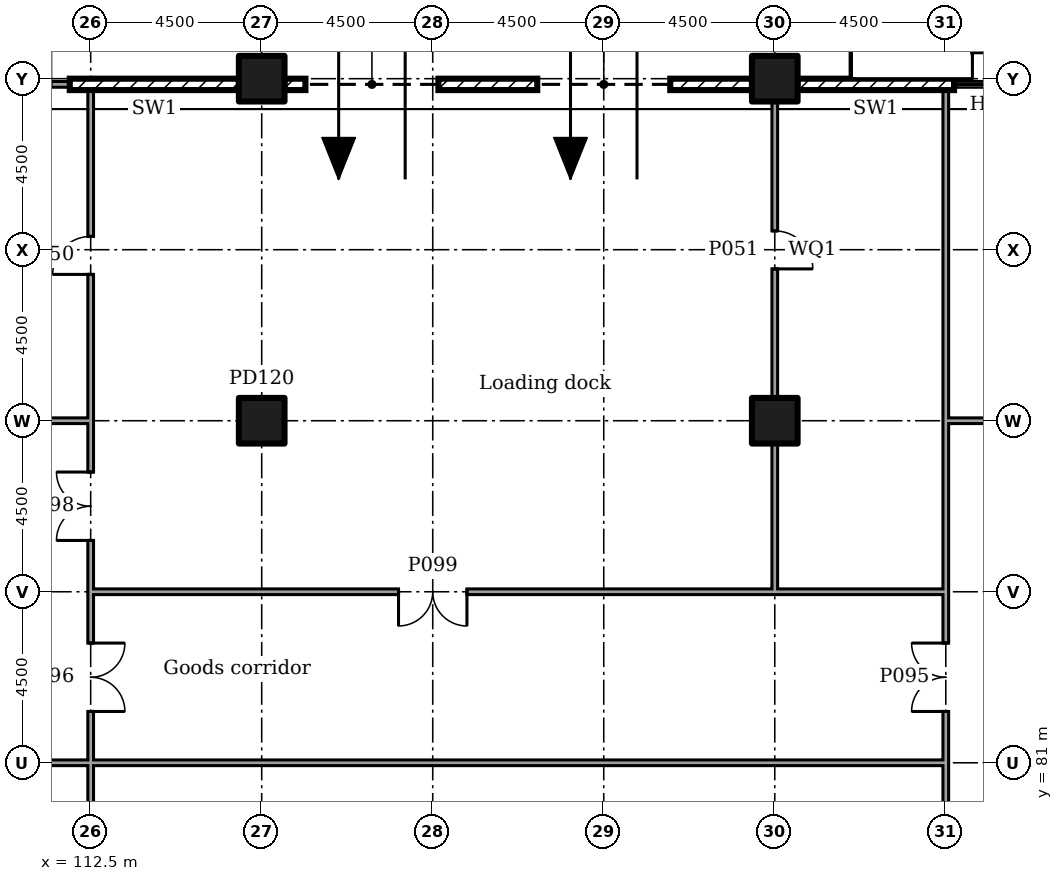
"""IFC4 building model, lengths in metres.
Left out: names, types, materials, properties, quantities, classifications, styles, units other than length and angle.
Written with IfcOpenShell. Run it as: python <this file> out.ifc"""

import sys

from ifc_helpers import new_model, si_unit, direction, frame, frame_2d, origin, origin_2d, place, context, subcontext, project, spatial, rectangle, extrude, element, fill, save


model = new_model("IFC4")
c1 = context("Model", 3, precision=1e-05, world=origin(), true_north=direction((0.0, 1.0)))
c2 = subcontext(c1, "Body", "Model", "MODEL_VIEW")
j1 = project(units=[si_unit("LENGTHUNIT", "METRE"), si_unit("PLANEANGLEUNIT", "RADIAN")], contexts=[c1])
p1 = place(None, origin())
s1 = spatial("IfcSite", under=j1, at=p1, CompositionType="ELEMENT")
p2 = place(p1, origin())
s2 = spatial("IfcBuilding", under=s1, at=p2, CompositionType="ELEMENT")
p3 = place(p2, origin())
s3 = spatial("IfcBuildingStorey", under=s2, at=p3, CompositionType="ELEMENT", Elevation=0.0)
for number, where in (
    (1, (117.0, 90.0, 0.0)),
    (2, (117.0, 99.0, 0.0)),
    (3, (130.5, 90.0, 0.0)),
    (4, (130.5, 99.0, 0.0)),
):
    element("IfcColumn", number, at=place(p3, frame(where)), inside=s3, PredefinedType="COLUMN", context=c2, shape_type="SweptSolid", body=[
        extrude(rectangle(XDim=1.2, YDim=1.2, at=origin_2d()), origin(), (0.0, 0.0, 1.0), 6.0),
    ])
p4 = place(p3, frame((135.217, 98.85, 0.0), z_axis=(0.0, 0.0, 1.0), x_axis=(-1.0, 0.0, 0.0)))
e5 = element("IfcWall", 5, at=p4, inside=s3, PredefinedType="ELEMENTEDWALL", context=c2, shape_type="SweptSolid", body=[
    extrude(rectangle(XDim=4.116, YDim=0.3, at=frame_2d((2.058, 0.0))), origin(), (0.0, 0.0, 1.0), 5.55),
])
p5 = place(p3, frame((129.9, 98.85, 0.0), z_axis=(0.0, 0.0, 1.0), x_axis=(-1.0, 0.0, 0.0)))
e6 = element("IfcWall", 6, at=p5, inside=s3, PredefinedType="ELEMENTEDWALL", context=c2, shape_type="SweptSolid", body=[
    extrude(rectangle(XDim=1.65, YDim=0.3, at=frame_2d((0.825, 0.0))), origin(), (0.0, 0.0, 1.0), 5.55),
])
p6 = place(p3, frame((128.25, 98.85, 0.0), z_axis=(0.0, 0.0, 1.0), x_axis=(-1.0, 0.0, 0.0)))
e7 = element("IfcWall", 7, at=p6, inside=s3, PredefinedType="ELEMENTEDWALL", context=c2, shape_type="SweptSolid", body=[
    extrude(rectangle(XDim=4.5, YDim=0.3, at=frame_2d((2.25, 0.0))), origin(), (0.0, 0.0, 1.0), 5.55),
])
p7 = place(p6, frame((0.5, 0.0, 0.0)))
e8 = element("IfcOpeningElement", 8, at=p7, cuts=e7, PredefinedType="OPENING", context=c2, shape_type="SweptSolid", body=[
    extrude(rectangle(XDim=3.5, YDim=4.5, at=frame_2d((1.75, 2.25))), frame((0.0, 0.16, 0.0), z_axis=(0.0, -1.0, 0.0), x_axis=(1.0, 0.0, 0.0)), (0.0, 0.0, 1.0), 0.32),
])
p8 = place(p3, frame((123.75, 98.85, 0.0), z_axis=(0.0, 0.0, 1.0), x_axis=(-1.0, 0.0, 0.0)))
e9 = element("IfcWall", 9, at=p8, inside=s3, PredefinedType="ELEMENTEDWALL", context=c2, shape_type="SweptSolid", body=[
    extrude(rectangle(XDim=1.6, YDim=0.3, at=frame_2d((0.8, 0.0))), origin(), (0.0, 0.0, 1.0), 5.55),
])
p9 = place(p3, frame((122.15, 98.85, 0.0), z_axis=(0.0, 0.0, 1.0), x_axis=(-1.0, 0.0, 0.0)))
e10 = element("IfcWall", 10, at=p9, inside=s3, PredefinedType="ELEMENTEDWALL", context=c2, shape_type="SweptSolid", body=[
    extrude(rectangle(XDim=4.55, YDim=0.3, at=frame_2d((2.275, 0.0))), origin(), (0.0, 0.0, 1.0), 5.55),
])
p10 = place(p9, frame((0.5, 0.0, 0.0)))
e11 = element("IfcOpeningElement", 11, at=p10, cuts=e10, PredefinedType="OPENING", context=c2, shape_type="SweptSolid", body=[
    extrude(rectangle(XDim=3.5, YDim=4.5, at=frame_2d((1.75, 2.25))), frame((0.0, 0.16, 0.0), z_axis=(0.0, -1.0, 0.0), x_axis=(1.0, 0.0, 0.0)), (0.0, 0.0, 1.0), 0.32),
])
p11 = place(p3, frame((116.4, 98.85, 0.0), z_axis=(0.0, 0.0, 1.0), x_axis=(-1.0, 0.0, 0.0)))
e12 = element("IfcWall", 12, at=p11, inside=s3, PredefinedType="ELEMENTEDWALL", context=c2, shape_type="SweptSolid", body=[
    extrude(rectangle(XDim=4.45, YDim=0.3, at=frame_2d((2.225, 0.0))), origin(), (0.0, 0.0, 1.0), 5.55),
])
p12 = place(p3, frame((111.95, 98.85, 0.0), z_axis=(0.0, 0.0, 1.0), x_axis=(-1.0, 0.0, 0.0)))
e13 = element("IfcWall", 13, at=p12, inside=s3, PredefinedType="SOLIDWALL", context=c2, shape_type="SweptSolid", body=[
    extrude(rectangle(XDim=3.4, YDim=0.15, at=frame_2d((1.7, 0.0))), origin(), (0.0, 0.0, 1.0), 5.55),
])
p13 = place(p12, frame((0.5, 0.0, 0.0)))
e14 = element("IfcOpeningElement", 14, at=p13, cuts=e13, PredefinedType="OPENING", context=c2, shape_type="SweptSolid", body=[
    extrude(rectangle(XDim=2.4, YDim=2.7, at=frame_2d((1.2, 1.35))), frame((0.0, 0.085, 0.0), z_axis=(0.0, -1.0, 0.0), x_axis=(1.0, 0.0, 0.0)), (0.0, 0.0, 1.0), 0.17),
])
p14 = place(p3, frame((135.0, 58.5, 0.0), z_axis=(0.0, 0.0, 1.0), x_axis=(0.0, 1.0, 0.0)))
e15 = element("IfcWall", 15, at=p14, inside=s3, PredefinedType="PARTITIONING", context=c2, shape_type="SweptSolid", body=[
    extrude(rectangle(XDim=22.575, YDim=0.15, at=frame_2d((11.288, 0.0))), origin(), (0.0, 0.0, 1.0), 5.55),
])
p15 = place(p14, frame((10.75, 0.0, 0.0)))
e16 = element("IfcOpeningElement", 16, at=p15, cuts=e15, PredefinedType="OPENING", context=c2, shape_type="SweptSolid", body=[
    extrude(rectangle(XDim=1.0, YDim=2.1, at=frame_2d((0.5, 1.05))), frame((0.0, 0.085, 0.0), z_axis=(0.0, -1.0, 0.0), x_axis=(1.0, 0.0, 0.0)), (0.0, 0.0, 1.0), 0.17),
])
p16 = place(p3, frame((135.0, 81.0, 0.0), z_axis=(0.0, 0.0, 1.0), x_axis=(0.0, 1.0, 0.0)))
e17 = element("IfcWall", 17, at=p16, inside=s3, PredefinedType="PARTITIONING", context=c2, shape_type="SweptSolid", body=[
    extrude(rectangle(XDim=4.575, YDim=0.15, at=frame_2d((2.288, 0.0))), origin(), (0.0, 0.0, 1.0), 5.55),
])
p17 = place(p16, frame((1.35, 0.0, 0.0)))
e18 = element("IfcOpeningElement", 18, at=p17, cuts=e17, PredefinedType="OPENING", context=c2, shape_type="SweptSolid", body=[
    extrude(rectangle(XDim=1.8, YDim=2.1, at=frame_2d((0.9, 1.05))), frame((0.0, 0.085, 0.0), z_axis=(0.0, -1.0, 0.0), x_axis=(1.0, 0.0, 0.0)), (0.0, 0.0, 1.0), 0.17),
])
p18 = place(p3, frame((135.0, 85.5, 0.0), z_axis=(0.0, 0.0, 1.0), x_axis=(0.0, 1.0, 0.0)))
e19 = element("IfcWall", 19, at=p18, inside=s3, PredefinedType="PARTITIONING", context=c2, shape_type="SweptSolid", body=[
    extrude(rectangle(XDim=4.575, YDim=0.15, at=frame_2d((2.288, 0.0))), origin(), (0.0, 0.0, 1.0), 5.55),
])
p19 = place(p3, frame((135.075, 90.0, 0.0)))
e20 = element("IfcWall", 20, at=p19, inside=s3, PredefinedType="PARTITIONING", context=c2, shape_type="SweptSolid", body=[
    extrude(rectangle(XDim=8.33, YDim=0.15, at=frame_2d((4.165, 0.0))), origin(), (0.0, 0.0, 1.0), 5.55),
])
p20 = place(p19, frame((3.625, 0.0, 0.0)))
e21 = element("IfcOpeningElement", 21, at=p20, cuts=e20, PredefinedType="OPENING", context=c2, shape_type="SweptSolid", body=[
    extrude(rectangle(XDim=1.0, YDim=2.1, at=frame_2d((0.5, 1.05))), frame((0.0, 0.085, 0.0), z_axis=(0.0, -1.0, 0.0), x_axis=(1.0, 0.0, 0.0)), (0.0, 0.0, 1.0), 0.17),
])
p21 = place(p3, frame((112.5, 59.495, 0.0), z_axis=(0.0, 0.0, 1.0), x_axis=(0.0, 1.0, 0.0)))
e22 = element("IfcWall", 22, at=p21, inside=s3, PredefinedType="PARTITIONING", context=c2, shape_type="SweptSolid", body=[
    extrude(rectangle(XDim=21.58, YDim=0.15, at=frame_2d((10.79, 0.0))), origin(), (0.0, 0.0, 1.0), 5.55),
])
p22 = place(p3, frame((94.575, 81.0, 0.0)))
e23 = element("IfcWall", 23, at=p22, inside=s3, PredefinedType="PARTITIONING", context=c2, shape_type="SweptSolid", body=[
    extrude(rectangle(XDim=17.85, YDim=0.15, at=frame_2d((8.925, 0.0))), origin(), (0.0, 0.0, 1.0), 5.55),
])
p23 = place(p3, frame((112.425, 81.0, 0.0)))
e24 = element("IfcWall", 24, at=p23, inside=s3, PredefinedType="PARTITIONING", context=c2, shape_type="SweptSolid", body=[
    extrude(rectangle(XDim=22.5, YDim=0.15, at=frame_2d((11.25, 0.0))), origin(), (0.0, 0.0, 1.0), 5.55),
])
p24 = place(p3, frame((112.5, 81.075, 0.0), z_axis=(0.0, 0.0, 1.0), x_axis=(0.0, 1.0, 0.0)))
e25 = element("IfcWall", 25, at=p24, inside=s3, PredefinedType="PARTITIONING", context=c2, shape_type="SweptSolid", body=[
    extrude(rectangle(XDim=4.5, YDim=0.15, at=frame_2d((2.25, 0.0))), origin(), (0.0, 0.0, 1.0), 5.55),
])
p25 = place(p24, frame((1.275, 0.0, 0.0)))
e26 = element("IfcOpeningElement", 26, at=p25, cuts=e25, PredefinedType="OPENING", context=c2, shape_type="SweptSolid", body=[
    extrude(rectangle(XDim=1.8, YDim=2.1, at=frame_2d((0.9, 1.05))), frame((0.0, 0.085, 0.0), z_axis=(0.0, -1.0, 0.0), x_axis=(1.0, 0.0, 0.0)), (0.0, 0.0, 1.0), 0.17),
])
p26 = place(p3, frame((104.095, 90.0, 0.0)))
e27 = element("IfcWall", 27, at=p26, inside=s3, PredefinedType="PARTITIONING", context=c2, shape_type="SweptSolid", body=[
    extrude(rectangle(XDim=8.48, YDim=0.15, at=frame_2d((4.24, 0.0))), origin(), (0.0, 0.0, 1.0), 5.55),
])
p27 = place(p3, frame((112.5, 85.5, 0.0), z_axis=(0.0, 0.0, 1.0), x_axis=(0.0, 1.0, 0.0)))
e28 = element("IfcWall", 28, at=p27, inside=s3, PredefinedType="PARTITIONING", context=c2, shape_type="SweptSolid", body=[
    extrude(rectangle(XDim=4.425, YDim=0.15, at=frame_2d((2.212, 0.0))), origin(), (0.0, 0.0, 1.0), 5.55),
])
p28 = place(p27, frame((1.35, 0.0, 0.0)))
e29 = element("IfcOpeningElement", 29, at=p28, cuts=e28, PredefinedType="OPENING", context=c2, shape_type="SweptSolid", body=[
    extrude(rectangle(XDim=1.8, YDim=2.1, at=frame_2d((0.9, 1.05))), frame((0.0, 0.085, 0.0), z_axis=(0.0, -1.0, 0.0), x_axis=(1.0, 0.0, 0.0)), (0.0, 0.0, 1.0), 0.17),
])
p29 = place(p3, frame((112.575, 85.5, 0.0)))
e30 = element("IfcWall", 30, at=p29, inside=s3, PredefinedType="PARTITIONING", context=c2, shape_type="SweptSolid", body=[
    extrude(rectangle(XDim=18.0, YDim=0.15, at=frame_2d((9.0, 0.0))), origin(), (0.0, 0.0, 1.0), 5.55),
])
p30 = place(p29, frame((8.025, 0.0, 0.0)))
e31 = element("IfcOpeningElement", 31, at=p30, cuts=e30, PredefinedType="OPENING", context=c2, shape_type="SweptSolid", body=[
    extrude(rectangle(XDim=1.8, YDim=2.1, at=frame_2d((0.9, 1.05))), frame((0.0, 0.085, 0.0), z_axis=(0.0, -1.0, 0.0), x_axis=(1.0, 0.0, 0.0)), (0.0, 0.0, 1.0), 0.17),
])
p31 = place(p3, frame((130.5, 85.5, 0.0)))
e32 = element("IfcWall", 32, at=p31, inside=s3, PredefinedType="PARTITIONING", context=c2, shape_type="SweptSolid", body=[
    extrude(rectangle(XDim=4.425, YDim=0.15, at=frame_2d((2.212, 0.0))), origin(), (0.0, 0.0, 1.0), 5.55),
])
p32 = place(p3, frame((112.5, 90.0, 0.0), z_axis=(0.0, 0.0, 1.0), x_axis=(0.0, 1.0, 0.0)))
e33 = element("IfcWall", 33, at=p32, inside=s3, PredefinedType="PARTITIONING", context=c2, shape_type="SweptSolid", body=[
    extrude(rectangle(XDim=8.7, YDim=0.15, at=frame_2d((4.35, 0.0))), origin(), (0.0, 0.0, 1.0), 5.55),
])
p33 = place(p32, frame((3.85, 0.0, 0.0)))
e34 = element("IfcOpeningElement", 34, at=p33, cuts=e33, PredefinedType="OPENING", context=c2, shape_type="SweptSolid", body=[
    extrude(rectangle(XDim=1.0, YDim=2.1, at=frame_2d((0.5, 1.05))), frame((0.0, 0.085, 0.0), z_axis=(0.0, -1.0, 0.0), x_axis=(1.0, 0.0, 0.0)), (0.0, 0.0, 1.0), 0.17),
])
p34 = place(p3, frame((130.5, 85.575, 0.0), z_axis=(0.0, 0.0, 1.0), x_axis=(0.0, 1.0, 0.0)))
e35 = element("IfcWall", 35, at=p34, inside=s3, PredefinedType="PARTITIONING", context=c2, shape_type="SweptSolid", body=[
    extrude(rectangle(XDim=3.83, YDim=0.15, at=frame_2d((1.915, 0.0))), origin(), (0.0, 0.0, 1.0), 5.55),
])
p35 = place(p3, frame((130.5, 90.595, 0.0), z_axis=(0.0, 0.0, 1.0), x_axis=(0.0, 1.0, 0.0)))
e36 = element("IfcWall", 36, at=p35, inside=s3, PredefinedType="PARTITIONING", context=c2, shape_type="SweptSolid", body=[
    extrude(rectangle(XDim=7.81, YDim=0.15, at=frame_2d((3.905, 0.0))), origin(), (0.0, 0.0, 1.0), 5.55),
])
p36 = place(p35, frame((3.4, 0.0, 0.0)))
e37 = element("IfcOpeningElement", 37, at=p36, cuts=e36, PredefinedType="OPENING", context=c2, shape_type="SweptSolid", body=[
    extrude(rectangle(XDim=1.0, YDim=2.1, at=frame_2d((0.5, 1.05))), frame((0.0, 0.085, 0.0), z_axis=(0.0, -1.0, 0.0), x_axis=(1.0, 0.0, 0.0)), (0.0, 0.0, 1.0), 0.17),
])
p37 = place(p3, frame((135.0, 90.0, 0.0), z_axis=(0.0, 0.0, 1.0), x_axis=(0.0, 1.0, 0.0)))
e38 = element("IfcWall", 38, at=p37, inside=s3, PredefinedType="PARTITIONING", context=c2, shape_type="SweptSolid", body=[
    extrude(rectangle(XDim=8.7, YDim=0.15, at=frame_2d((4.35, 0.0))), origin(), (0.0, 0.0, 1.0), 5.55),
])
p38 = place(p7, origin())
e39 = element("IfcDoor", 39, at=p38, inside=s3, OperationType="ROLLINGUP", PredefinedType="NOTDEFINED", context=c2, shape_type="SweptSolid", body=[
    extrude(rectangle(XDim=3.5, YDim=4.5, at=frame_2d((1.75, 2.25))), frame((0.0, 0.025, 0.0), z_axis=(0.0, -1.0, 0.0), x_axis=(1.0, 0.0, 0.0)), (0.0, 0.0, 1.0), 0.05),
])
fill(e8, e39)
p39 = place(p10, origin())
e40 = element("IfcDoor", 40, at=p39, inside=s3, OperationType="ROLLINGUP", PredefinedType="NOTDEFINED", context=c2, shape_type="SweptSolid", body=[
    extrude(rectangle(XDim=3.5, YDim=4.5, at=frame_2d((1.75, 2.25))), frame((0.0, 0.025, 0.0), z_axis=(0.0, -1.0, 0.0), x_axis=(1.0, 0.0, 0.0)), (0.0, 0.0, 1.0), 0.05),
])
fill(e11, e40)
p40 = place(p33, origin())
e41 = element("IfcDoor", 41, at=p40, inside=s3, OperationType="SINGLE_SWING_RIGHT", PredefinedType="DOOR", context=c2, shape_type="SweptSolid", body=[
    extrude(rectangle(XDim=1.0, YDim=2.1, at=frame_2d((0.5, 1.05))), frame((0.0, 0.025, 0.0), z_axis=(0.0, -1.0, 0.0), x_axis=(1.0, 0.0, 0.0)), (0.0, 0.0, 1.0), 0.05),
])
fill(e34, e41)
p41 = place(p36, frame((1.0, 0.0, 0.0), x_axis=(-1.0, 0.0, 0.0)))
e42 = element("IfcDoor", 42, at=p41, inside=s3, OperationType="SINGLE_SWING_LEFT", PredefinedType="DOOR", context=c2, shape_type="SweptSolid", body=[
    extrude(rectangle(XDim=1.0, YDim=2.1, at=frame_2d((0.5, 1.05))), frame((0.0, 0.025, 0.0), z_axis=(0.0, -1.0, 0.0), x_axis=(1.0, 0.0, 0.0)), (0.0, 0.0, 1.0), 0.05),
])
fill(e37, e42)
p42 = place(p17, origin())
e43 = element("IfcDoor", 43, at=p42, inside=s3, OperationType="DOUBLE_DOOR_SINGLE_SWING", PredefinedType="DOOR", context=c2, shape_type="SweptSolid", body=[
    extrude(rectangle(XDim=1.8, YDim=2.1, at=frame_2d((0.9, 1.05))), frame((0.0, 0.025, 0.0), z_axis=(0.0, -1.0, 0.0), x_axis=(1.0, 0.0, 0.0)), (0.0, 0.0, 1.0), 0.05),
])
fill(e18, e43)
p43 = place(p25, frame((1.8, 0.0, 0.0), x_axis=(-1.0, 0.0, 0.0)))
e44 = element("IfcDoor", 44, at=p43, inside=s3, OperationType="DOUBLE_DOOR_SINGLE_SWING", PredefinedType="DOOR", context=c2, shape_type="SweptSolid", body=[
    extrude(rectangle(XDim=1.8, YDim=2.1, at=frame_2d((0.9, 1.05))), frame((0.0, 0.025, 0.0), z_axis=(0.0, -1.0, 0.0), x_axis=(1.0, 0.0, 0.0)), (0.0, 0.0, 1.0), 0.05),
])
fill(e26, e44)
p44 = place(p28, origin())
e45 = element("IfcDoor", 45, at=p44, inside=s3, OperationType="DOUBLE_DOOR_SINGLE_SWING", PredefinedType="DOOR", context=c2, shape_type="SweptSolid", body=[
    extrude(rectangle(XDim=1.8, YDim=2.1, at=frame_2d((0.9, 1.05))), frame((0.0, 0.025, 0.0), z_axis=(0.0, -1.0, 0.0), x_axis=(1.0, 0.0, 0.0)), (0.0, 0.0, 1.0), 0.05),
])
fill(e29, e45)
p45 = place(p30, frame((1.8, 0.0, 0.0), x_axis=(-1.0, 0.0, 0.0)))
e46 = element("IfcDoor", 46, at=p45, inside=s3, OperationType="DOUBLE_DOOR_SINGLE_SWING", PredefinedType="DOOR", context=c2, shape_type="SweptSolid", body=[
    extrude(rectangle(XDim=1.8, YDim=2.1, at=frame_2d((0.9, 1.05))), frame((0.0, 0.025, 0.0), z_axis=(0.0, -1.0, 0.0), x_axis=(1.0, 0.0, 0.0)), (0.0, 0.0, 1.0), 0.05),
])
fill(e31, e46)
save(model, sys.argv[1])
